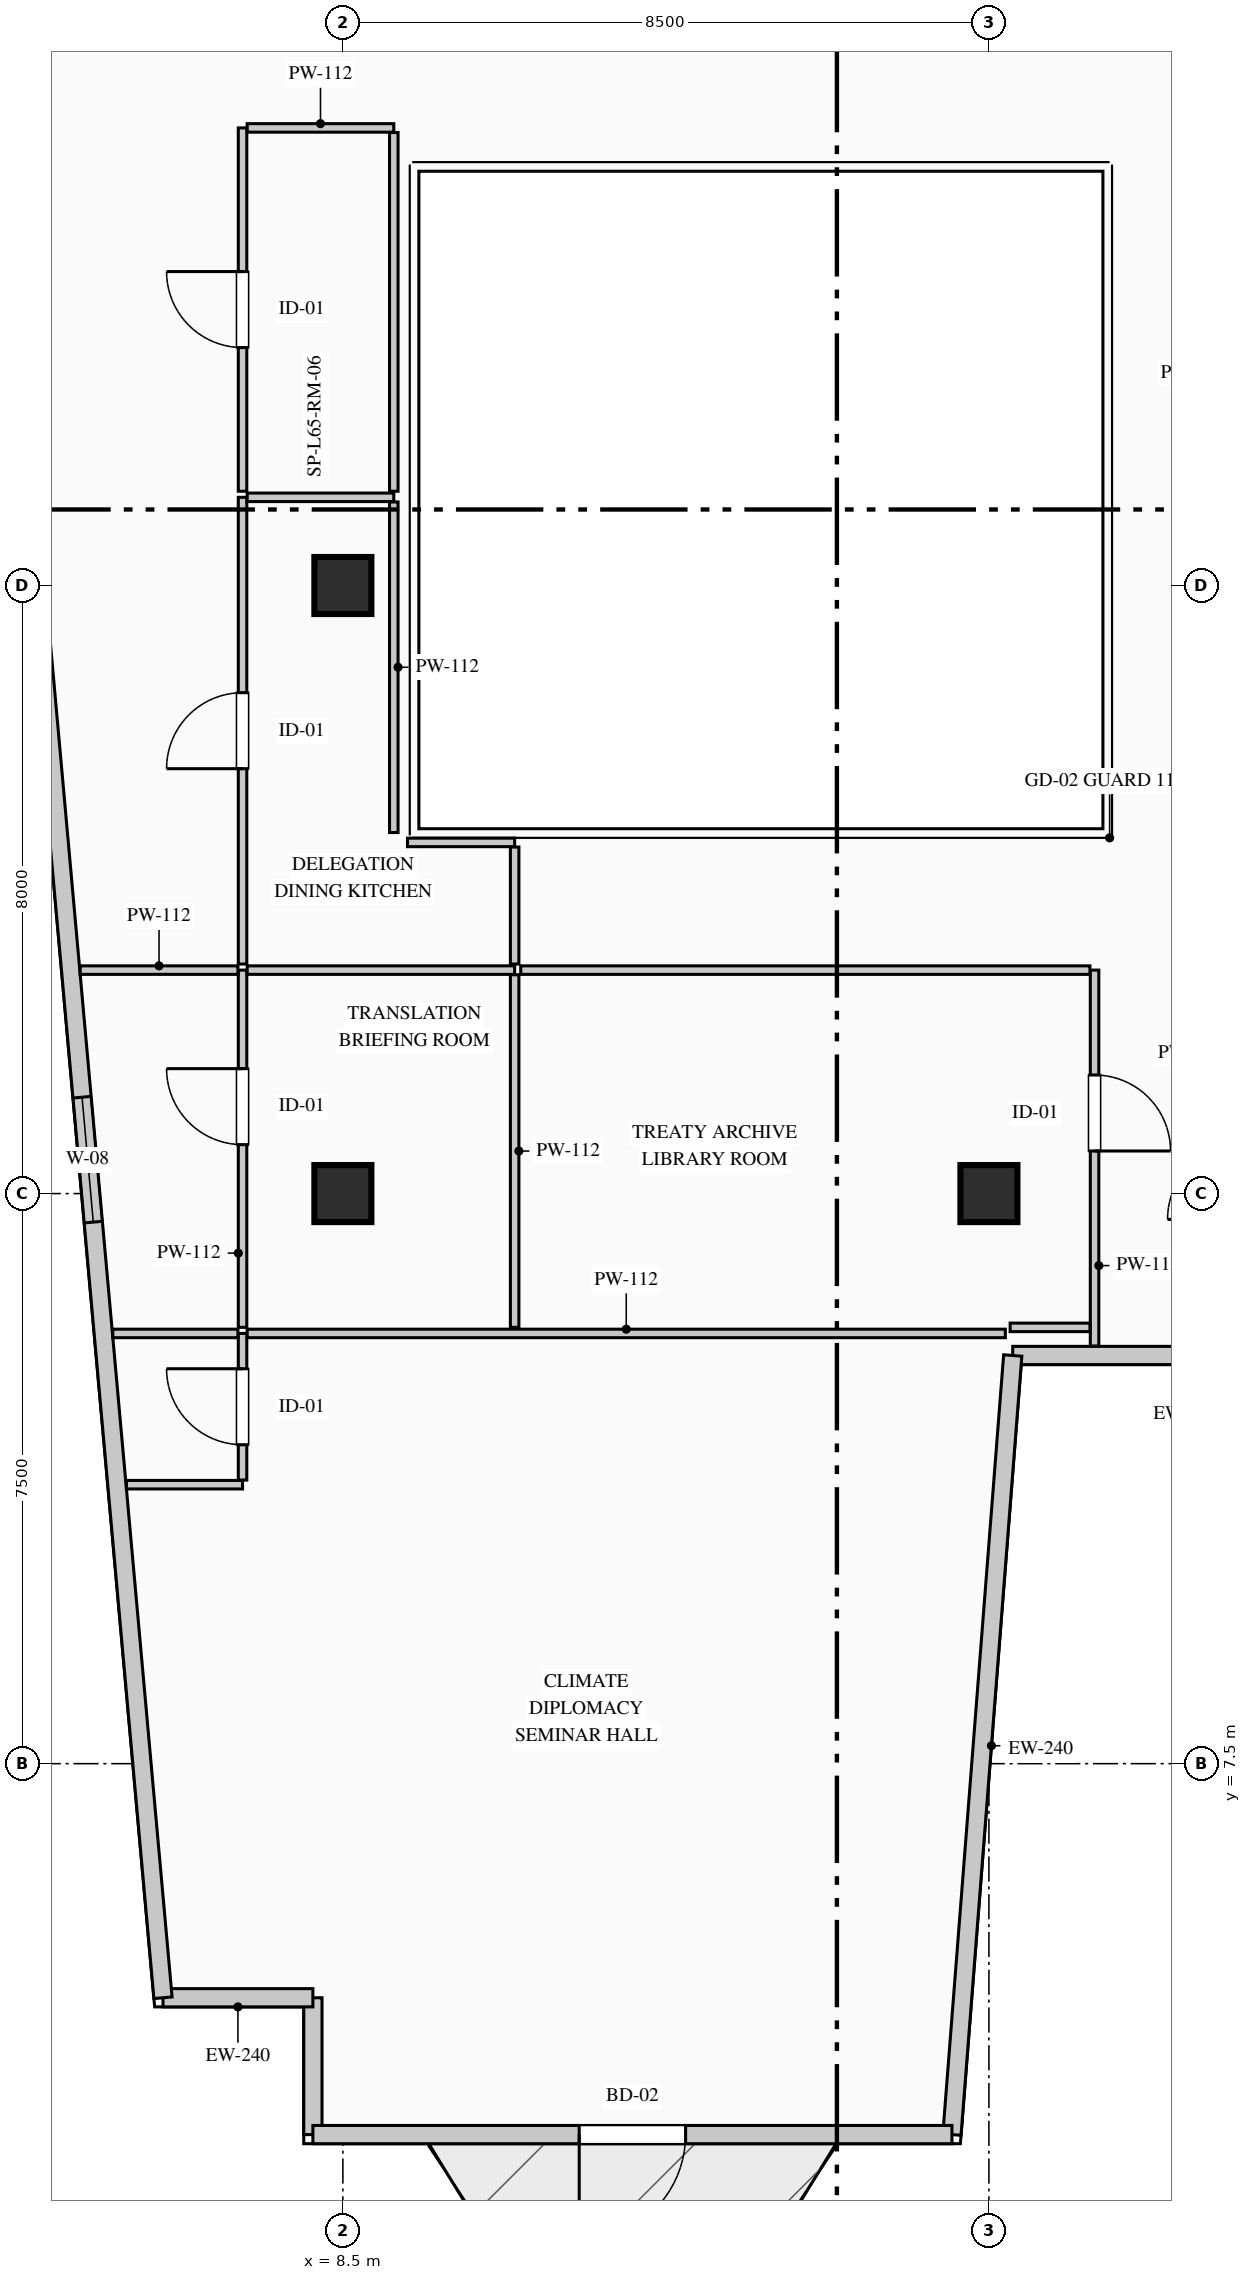
"""IFC4 building model, lengths in metres.
Left out: names, types, materials, properties, quantities, classifications, styles, units other than length and angle.
Written with IfcOpenShell. Run it as: python <this file> out.ifc"""

import sys

from ifc_helpers import new_model, si_unit, direction, frame, frame_2d, origin, origin_2d, place, context, subcontext, project, spatial, rectangle, extrude, element, fill, save


model = new_model("IFC4")
c1 = context("Model", 3, precision=1e-05, world=origin(), true_north=direction((0.0, 1.0)))
c2 = subcontext(c1, "Body", "Model", "MODEL_VIEW")
j1 = project(units=[si_unit("LENGTHUNIT", "METRE"), si_unit("PLANEANGLEUNIT", "RADIAN")], contexts=[c1])
p1 = place(None, origin())
s1 = spatial("IfcSite", under=j1, at=p1, CompositionType="ELEMENT")
p2 = place(p1, origin())
s2 = spatial("IfcBuilding", under=s1, at=p2, CompositionType="ELEMENT")
p3 = place(p2, frame((0.0, 0.0, 272.5)))
s3 = spatial("IfcBuildingStorey", under=s2, at=p3, CompositionType="ELEMENT", Elevation=272.5)
for number, where, z_axis, x_axis in (
    (1, (8.5, 15.0, 0.0), (0.0, 0.0, 1.0), (1.0, 0.0, 0.0)),
    (2, (8.5, 23.0, 0.0), (0.0, 0.0, 1.0), (1.0, 0.0, 0.0)),
    (3, (17.0, 15.0, 0.0), (0.0, 0.0, 1.0), (1.0, 0.0, 0.0)),
):
    element("IfcColumn", number, at=place(p3, frame(where, z_axis=z_axis, x_axis=x_axis)), inside=s3, PredefinedType="COLUMN", context=c2, shape_type="SweptSolid", body=[
        extrude(rectangle(XDim=0.75, YDim=0.75, at=origin_2d()), origin(), (0.0, 0.0, 1.0), 3.95),
    ])
p4 = place(p3, frame((8.105, 2.62, 0.0), z_axis=(0.0, 0.0, 1.0), x_axis=(0.0, 1.0, 0.0)))
e4 = element("IfcWall", 4, at=p4, inside=s3, PredefinedType="STANDARD", context=c2, shape_type="SweptSolid", body=[
    extrude(rectangle(XDim=1.8, YDim=0.24, at=frame_2d((0.9, 0.0))), origin(), (0.0, 0.0, 1.0), 3.7),
])
p5 = place(p3, frame((8.105, 4.42, 0.0), z_axis=(0.0, 0.0, 1.0), x_axis=(-1.0, 0.0, 0.0)))
e5 = element("IfcWall", 5, at=p5, inside=s3, PredefinedType="STANDARD", context=c2, shape_type="SweptSolid", body=[
    extrude(rectangle(XDim=1.972, YDim=0.24, at=frame_2d((0.986, 0.0))), origin(), (0.0, 0.0, 1.0), 3.7),
])
p6 = place(p3, frame((6.133, 4.42, 0.0), z_axis=(0.0, 0.0, 1.0), x_axis=(-0.089522678378, 0.995984784048, 0.0)))
e6 = element("IfcWall", 6, at=p6, inside=s3, PredefinedType="STANDARD", context=c2, shape_type="SweptSolid", body=[
    extrude(rectangle(XDim=37.31, YDim=0.24, at=frame_2d((18.655, 0.0))), origin(), (0.0, 0.0, 1.0), 3.7),
])
p7 = place(p6, frame((10.246, 0.0, 0.9)))
e7 = element("IfcOpeningElement", 7, at=p7, cuts=e6, PredefinedType="OPENING", context=c2, shape_type="SweptSolid", body=[
    extrude(rectangle(XDim=1.65, YDim=1.95, at=frame_2d((0.825, 0.975))), frame((0.0, 0.13, 0.0), z_axis=(0.0, -1.0, 0.0), x_axis=(1.0, 0.0, 0.0)), (0.0, 0.0, 1.0), 0.26),
])
p8 = place(p3, frame((21.867, 12.87, 0.0), z_axis=(0.0, 0.0, 1.0), x_axis=(-1.0, 0.0, 0.0)))
e8 = element("IfcWall", 8, at=p8, inside=s3, PredefinedType="STANDARD", context=c2, shape_type="SweptSolid", body=[
    extrude(rectangle(XDim=4.553, YDim=0.24, at=frame_2d((2.277, 0.0))), origin(), (0.0, 0.0, 1.0), 3.7),
])
p9 = place(p3, frame((17.313, 12.87, 0.0), z_axis=(0.0, 0.0, 1.0), x_axis=(-0.077816860153, -0.996967670627, 0.0)))
e9 = element("IfcWall", 9, at=p9, inside=s3, PredefinedType="STANDARD", context=c2, shape_type="SweptSolid", body=[
    extrude(rectangle(XDim=10.281, YDim=0.24, at=frame_2d((5.141, 0.0))), origin(), (0.0, 0.0, 1.0), 3.7),
])
p10 = place(p3, frame((16.513, 2.62, 0.0), z_axis=(0.0, 0.0, 1.0), x_axis=(-1.0, 0.0, 0.0)))
e10 = element("IfcWall", 10, at=p10, inside=s3, PredefinedType="STANDARD", context=c2, shape_type="SweptSolid", body=[
    extrude(rectangle(XDim=8.408, YDim=0.24, at=frame_2d((4.204, 0.0))), origin(), (0.0, 0.0, 1.0), 3.7),
])
p11 = place(p10, frame((3.504, 0.0, 0.0)))
e11 = element("IfcOpeningElement", 11, at=p11, cuts=e10, PredefinedType="OPENING", context=c2, shape_type="SweptSolid", body=[
    extrude(rectangle(XDim=1.4, YDim=2.2, at=frame_2d((0.7, 1.1))), frame((0.0, 0.13, 0.0), z_axis=(0.0, -1.0, 0.0), x_axis=(1.0, 0.0, 0.0)), (0.0, 0.0, 1.0), 0.26),
])
p12 = place(p3, frame((5.652, 11.17, 0.0), z_axis=(0.0, 0.0, 1.0), x_axis=(1.0, 0.0, 0.0)))
e12 = element("IfcWall", 12, at=p12, inside=s3, PredefinedType="PARTITIONING", context=c2, shape_type="SweptSolid", body=[
    extrude(rectangle(XDim=1.528, YDim=0.112, at=frame_2d((0.764, 0.0))), origin(), (0.0, 0.0, 1.0), 3.7),
])
p13 = place(p3, frame((7.18, 11.231, 0.0), z_axis=(0.0, 0.0, 1.0), x_axis=(0.0, 1.0, 0.0)))
e13 = element("IfcWall", 13, at=p13, inside=s3, PredefinedType="PARTITIONING", context=c2, shape_type="SweptSolid", body=[
    extrude(rectangle(XDim=1.929, YDim=0.112, at=frame_2d((0.964, 0.0))), origin(), (0.0, 0.0, 1.0), 3.7),
])
p14 = place(p13, frame((0.465, 0.0, 0.0)))
e14 = element("IfcOpeningElement", 14, at=p14, cuts=e13, PredefinedType="OPENING", context=c2, shape_type="SweptSolid", body=[
    extrude(rectangle(XDim=1.0, YDim=2.15, at=frame_2d((0.5, 1.075))), frame((0.0, 0.066, 0.0), z_axis=(0.0, -1.0, 0.0), x_axis=(1.0, 0.0, 0.0)), (0.0, 0.0, 1.0), 0.132),
])
p15 = place(p3, frame((5.473, 13.16, 0.0), z_axis=(0.0, 0.0, 1.0), x_axis=(1.0, 0.0, 0.0)))
e15 = element("IfcWall", 15, at=p15, inside=s3, PredefinedType="PARTITIONING", context=c2, shape_type="SweptSolid", body=[
    extrude(rectangle(XDim=1.646, YDim=0.112, at=frame_2d((0.823, 0.0))), origin(), (0.0, 0.0, 1.0), 3.7),
])
p16 = place(p3, frame((7.241, 13.16, 0.0), z_axis=(0.0, 0.0, 1.0), x_axis=(1.0, 0.0, 0.0)))
e16 = element("IfcWall", 16, at=p16, inside=s3, PredefinedType="PARTITIONING", context=c2, shape_type="SweptSolid", body=[
    extrude(rectangle(XDim=9.975, YDim=0.112, at=frame_2d((4.988, 0.0))), origin(), (0.0, 0.0, 1.0), 3.7),
])
p17 = place(p3, frame((7.18, 13.24, 0.0), z_axis=(0.0, 0.0, 1.0), x_axis=(0.0, 1.0, 0.0)))
e17 = element("IfcWall", 17, at=p17, inside=s3, PredefinedType="PARTITIONING", context=c2, shape_type="SweptSolid", body=[
    extrude(rectangle(XDim=4.7, YDim=0.112, at=frame_2d((2.35, 0.0))), origin(), (0.0, 0.0, 1.0), 3.7),
])
p18 = place(p17, frame((2.404, 0.0, 0.0)))
e18 = element("IfcOpeningElement", 18, at=p18, cuts=e17, PredefinedType="OPENING", context=c2, shape_type="SweptSolid", body=[
    extrude(rectangle(XDim=1.0, YDim=2.15, at=frame_2d((0.5, 1.075))), frame((0.0, 0.066, 0.0), z_axis=(0.0, -1.0, 0.0), x_axis=(1.0, 0.0, 0.0)), (0.0, 0.0, 1.0), 0.132),
])
p19 = place(p3, frame((5.044, 17.94, 0.0), z_axis=(0.0, 0.0, 1.0), x_axis=(1.0, 0.0, 0.0)))
e19 = element("IfcWall", 19, at=p19, inside=s3, PredefinedType="PARTITIONING", context=c2, shape_type="SweptSolid", body=[
    extrude(rectangle(XDim=2.075, YDim=0.112, at=frame_2d((1.038, 0.0))), origin(), (0.0, 0.0, 1.0), 3.7),
])
p20 = place(p3, frame((7.241, 17.94, 0.0), z_axis=(0.0, 0.0, 1.0), x_axis=(1.0, 0.0, 0.0)))
e20 = element("IfcWall", 20, at=p20, inside=s3, PredefinedType="PARTITIONING", context=c2, shape_type="SweptSolid", body=[
    extrude(rectangle(XDim=3.519, YDim=0.112, at=frame_2d((1.76, 0.0))), origin(), (0.0, 0.0, 1.0), 3.7),
])
p21 = place(p3, frame((10.76, 17.879, 0.0), z_axis=(0.0, 0.0, 1.0), x_axis=(0.0, -1.0, 0.0)))
e21 = element("IfcWall", 21, at=p21, inside=s3, PredefinedType="PARTITIONING", context=c2, shape_type="SweptSolid", body=[
    extrude(rectangle(XDim=4.639, YDim=0.112, at=frame_2d((2.319, 0.0))), origin(), (0.0, 0.0, 1.0), 3.7),
])
p22 = place(p3, frame((18.39, 17.94, 0.0), z_axis=(0.0, 0.0, 1.0), x_axis=(0.0, -1.0, 0.0)))
e22 = element("IfcWall", 22, at=p22, inside=s3, PredefinedType="PARTITIONING", context=c2, shape_type="SweptSolid", body=[
    extrude(rectangle(XDim=4.945, YDim=0.112, at=frame_2d((2.472, 0.0))), origin(), (0.0, 0.0, 1.0), 3.7),
])
p23 = place(p22, frame((1.38, 0.0, 0.0)))
e23 = element("IfcOpeningElement", 23, at=p23, cuts=e22, PredefinedType="OPENING", context=c2, shape_type="SweptSolid", body=[
    extrude(rectangle(XDim=1.0, YDim=2.15, at=frame_2d((0.5, 1.075))), frame((0.0, 0.066, 0.0), z_axis=(0.0, -1.0, 0.0), x_axis=(1.0, 0.0, 0.0)), (0.0, 0.0, 1.0), 0.132),
])
p24 = place(p3, frame((18.329, 13.24, 0.0), z_axis=(0.0, 0.0, 1.0), x_axis=(-1.0, 0.0, 0.0)))
e24 = element("IfcWall", 24, at=p24, inside=s3, PredefinedType="PARTITIONING", context=c2, shape_type="SweptSolid", body=[
    extrude(rectangle(XDim=1.05, YDim=0.112, at=frame_2d((0.525, 0.0))), origin(), (0.0, 0.0, 1.0), 3.7),
])
p25 = place(p3, frame((10.84, 17.94, 0.0), z_axis=(0.0, 0.0, 1.0), x_axis=(1.0, 0.0, 0.0)))
e25 = element("IfcWall", 25, at=p25, inside=s3, PredefinedType="PARTITIONING", context=c2, shape_type="SweptSolid", body=[
    extrude(rectangle(XDim=7.489, YDim=0.112, at=frame_2d((3.745, 0.0))), origin(), (0.0, 0.0, 1.0), 3.7),
])
p26 = place(p3, frame((9.35, 19.62, 0.0), z_axis=(0.0, 0.0, 1.0), x_axis=(1.0, 0.0, 0.0)))
e26 = element("IfcWall", 26, at=p26, inside=s3, PredefinedType="PARTITIONING", context=c2, shape_type="SweptSolid", body=[
    extrude(rectangle(XDim=1.41, YDim=0.112, at=frame_2d((0.705, 0.0))), origin(), (0.0, 0.0, 1.0), 3.7),
])
p27 = place(p3, frame((10.76, 19.559, 0.0), z_axis=(0.0, 0.0, 1.0), x_axis=(0.0, -1.0, 0.0)))
e27 = element("IfcWall", 27, at=p27, inside=s3, PredefinedType="PARTITIONING", context=c2, shape_type="SweptSolid", body=[
    extrude(rectangle(XDim=1.539, YDim=0.112, at=frame_2d((0.77, 0.0))), origin(), (0.0, 0.0, 1.0), 3.7),
])
p28 = place(p3, frame((7.18, 18.02, 0.0), z_axis=(0.0, 0.0, 1.0), x_axis=(0.0, 1.0, 0.0)))
e28 = element("IfcWall", 28, at=p28, inside=s3, PredefinedType="PARTITIONING", context=c2, shape_type="SweptSolid", body=[
    extrude(rectangle(XDim=6.14, YDim=0.112, at=frame_2d((3.07, 0.0))), origin(), (0.0, 0.0, 1.0), 3.7),
])
p29 = place(p28, frame((2.57, 0.0, 0.0)))
e29 = element("IfcOpeningElement", 29, at=p29, cuts=e28, PredefinedType="OPENING", context=c2, shape_type="SweptSolid", body=[
    extrude(rectangle(XDim=1.0, YDim=2.15, at=frame_2d((0.5, 1.075))), frame((0.0, 0.066, 0.0), z_axis=(0.0, -1.0, 0.0), x_axis=(1.0, 0.0, 0.0)), (0.0, 0.0, 1.0), 0.132),
])
p30 = place(p3, frame((7.241, 24.16, 0.0), z_axis=(0.0, 0.0, 1.0), x_axis=(1.0, 0.0, 0.0)))
e30 = element("IfcWall", 30, at=p30, inside=s3, PredefinedType="PARTITIONING", context=c2, shape_type="SweptSolid", body=[
    extrude(rectangle(XDim=1.929, YDim=0.112, at=frame_2d((0.964, 0.0))), origin(), (0.0, 0.0, 1.0), 3.7),
])
p31 = place(p3, frame((9.17, 24.099, 0.0), z_axis=(0.0, 0.0, 1.0), x_axis=(0.0, -1.0, 0.0)))
e31 = element("IfcWall", 31, at=p31, inside=s3, PredefinedType="PARTITIONING", context=c2, shape_type="SweptSolid", body=[
    extrude(rectangle(XDim=4.349, YDim=0.112, at=frame_2d((2.175, 0.0))), origin(), (0.0, 0.0, 1.0), 3.285),
])
p32 = place(p3, frame((7.18, 24.24, 0.0), z_axis=(0.0, 0.0, 1.0), x_axis=(0.0, 1.0, 0.0)))
e32 = element("IfcWall", 32, at=p32, inside=s3, PredefinedType="PARTITIONING", context=c2, shape_type="SweptSolid", body=[
    extrude(rectangle(XDim=4.78, YDim=0.112, at=frame_2d((2.39, 0.0))), origin(), (0.0, 0.0, 1.0), 3.7),
])
p33 = place(p32, frame((1.89, 0.0, 0.0)))
e33 = element("IfcOpeningElement", 33, at=p33, cuts=e32, PredefinedType="OPENING", context=c2, shape_type="SweptSolid", body=[
    extrude(rectangle(XDim=1.0, YDim=2.15, at=frame_2d((0.5, 1.075))), frame((0.0, 0.066, 0.0), z_axis=(0.0, -1.0, 0.0), x_axis=(1.0, 0.0, 0.0)), (0.0, 0.0, 1.0), 0.132),
])
p34 = place(p3, frame((7.241, 29.02, 0.0), z_axis=(0.0, 0.0, 1.0), x_axis=(1.0, 0.0, 0.0)))
e34 = element("IfcWall", 34, at=p34, inside=s3, PredefinedType="PARTITIONING", context=c2, shape_type="SweptSolid", body=[
    extrude(rectangle(XDim=1.929, YDim=0.112, at=frame_2d((0.964, 0.0))), origin(), (0.0, 0.0, 1.0), 3.7),
])
p35 = place(p3, frame((9.17, 28.959, 0.0), z_axis=(0.0, 0.0, 1.0), x_axis=(0.0, -1.0, 0.0)))
e35 = element("IfcWall", 35, at=p35, inside=s3, PredefinedType="PARTITIONING", context=c2, shape_type="SweptSolid", body=[
    extrude(rectangle(XDim=4.719, YDim=0.112, at=frame_2d((2.359, 0.0))), origin(), (0.0, 0.0, 1.0), 3.285),
])
p36 = place(p7, origin())
e36 = element("IfcWindow", 36, at=p36, inside=s3, PartitioningType="SINGLE_PANEL", PredefinedType="WINDOW", context=c2, shape_type="SweptSolid", body=[
    extrude(rectangle(XDim=1.65, YDim=1.95, at=frame_2d((0.825, 0.975))), frame((0.0, 0.03, 0.0), z_axis=(0.0, -1.0, 0.0), x_axis=(1.0, 0.0, 0.0)), (0.0, 0.0, 1.0), 0.06),
])
fill(e7, e36)
p37 = place(p11, origin())
e37 = element("IfcDoor", 37, at=p37, inside=s3, OperationType="SINGLE_SWING_RIGHT", PredefinedType="DOOR", context=c2, shape_type="SweptSolid", body=[
    extrude(rectangle(XDim=1.4, YDim=2.2, at=frame_2d((0.7, 1.1))), frame((0.0, 0.025, 0.0), z_axis=(0.0, -1.0, 0.0), x_axis=(1.0, 0.0, 0.0)), (0.0, 0.0, 1.0), 0.05),
])
fill(e11, e37)
p38 = place(p14, origin())
e38 = element("IfcDoor", 38, at=p38, inside=s3, OperationType="SINGLE_SWING_RIGHT", PredefinedType="DOOR", context=c2, shape_type="SweptSolid", body=[
    extrude(rectangle(XDim=1.0, YDim=2.15, at=frame_2d((0.5, 1.075))), frame((0.0, 0.025, 0.0), z_axis=(0.0, -1.0, 0.0), x_axis=(1.0, 0.0, 0.0)), (0.0, 0.0, 1.0), 0.05),
])
fill(e14, e38)
p39 = place(p18, origin())
e39 = element("IfcDoor", 39, at=p39, inside=s3, OperationType="SINGLE_SWING_RIGHT", PredefinedType="DOOR", context=c2, shape_type="SweptSolid", body=[
    extrude(rectangle(XDim=1.0, YDim=2.15, at=frame_2d((0.5, 1.075))), frame((0.0, 0.025, 0.0), z_axis=(0.0, -1.0, 0.0), x_axis=(1.0, 0.0, 0.0)), (0.0, 0.0, 1.0), 0.05),
])
fill(e18, e39)
p40 = place(p23, origin())
e40 = element("IfcDoor", 40, at=p40, inside=s3, OperationType="SINGLE_SWING_RIGHT", PredefinedType="DOOR", context=c2, shape_type="SweptSolid", body=[
    extrude(rectangle(XDim=1.0, YDim=2.15, at=frame_2d((0.5, 1.075))), frame((0.0, 0.025, 0.0), z_axis=(0.0, -1.0, 0.0), x_axis=(1.0, 0.0, 0.0)), (0.0, 0.0, 1.0), 0.05),
])
fill(e23, e40)
p41 = place(p29, origin())
e41 = element("IfcDoor", 41, at=p41, inside=s3, OperationType="SINGLE_SWING_LEFT", PredefinedType="DOOR", context=c2, shape_type="SweptSolid", body=[
    extrude(rectangle(XDim=1.0, YDim=2.15, at=frame_2d((0.5, 1.075))), frame((0.0, 0.025, 0.0), z_axis=(0.0, -1.0, 0.0), x_axis=(1.0, 0.0, 0.0)), (0.0, 0.0, 1.0), 0.05),
])
fill(e29, e41)
p42 = place(p33, origin())
e42 = element("IfcDoor", 42, at=p42, inside=s3, OperationType="SINGLE_SWING_RIGHT", PredefinedType="DOOR", context=c2, shape_type="SweptSolid", body=[
    extrude(rectangle(XDim=1.0, YDim=2.15, at=frame_2d((0.5, 1.075))), frame((0.0, 0.025, 0.0), z_axis=(0.0, -1.0, 0.0), x_axis=(1.0, 0.0, 0.0)), (0.0, 0.0, 1.0), 0.05),
])
fill(e33, e42)
save(model, sys.argv[1])
